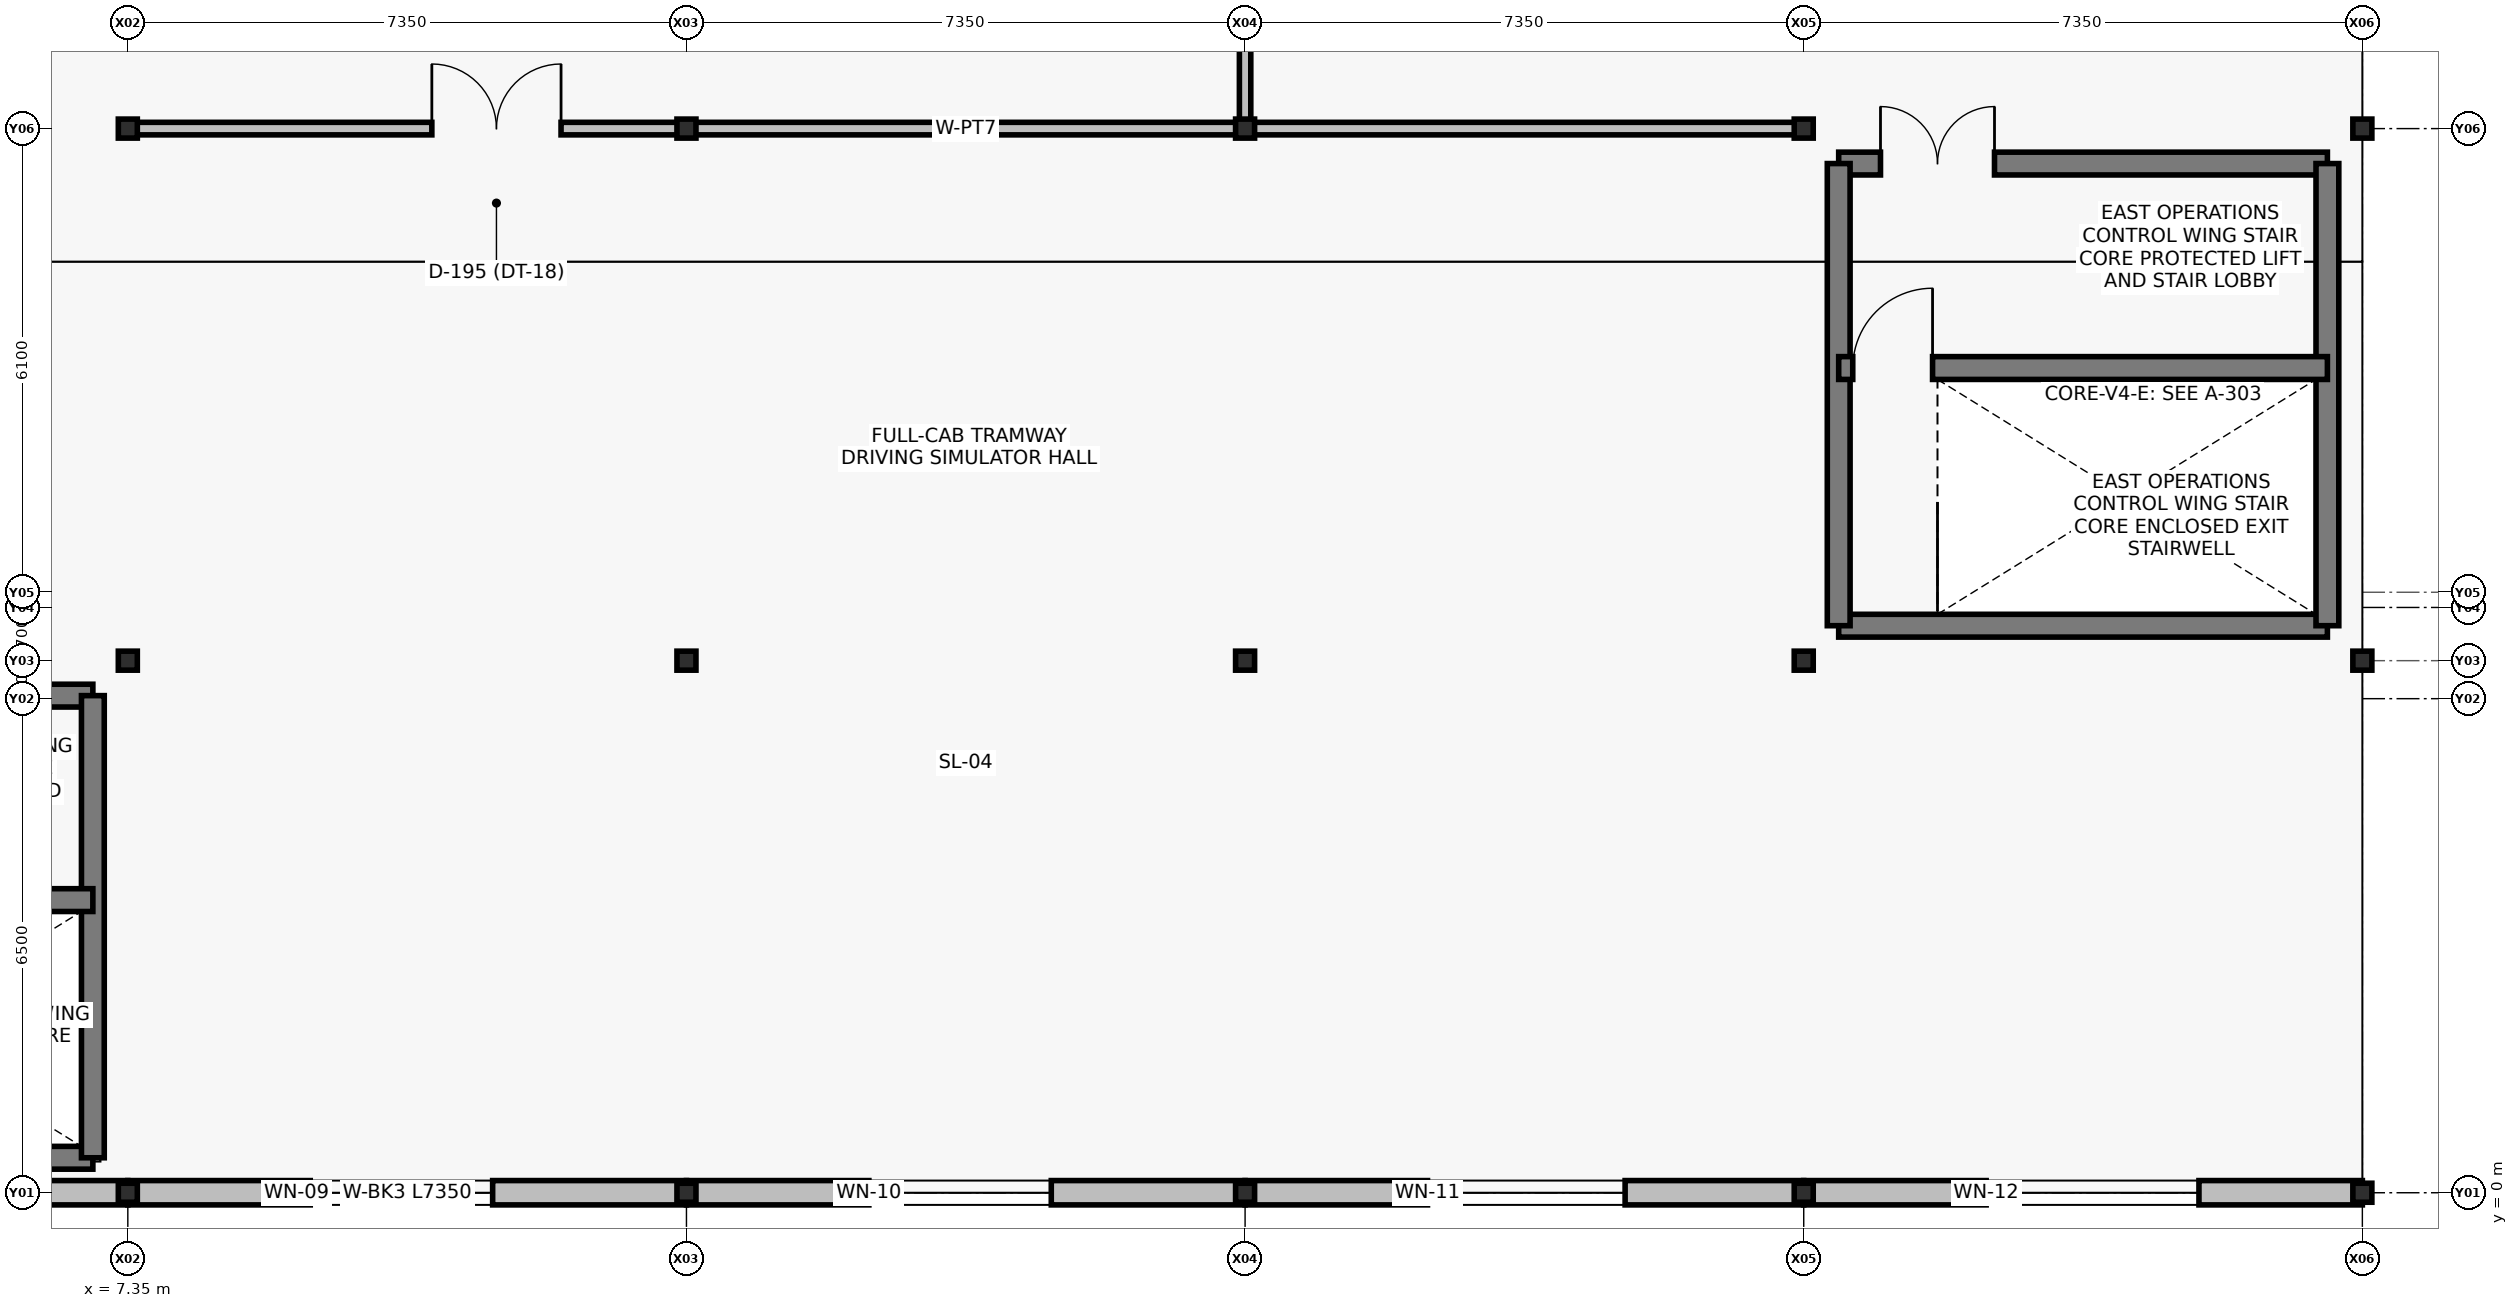
"""IFC4 building model, lengths in metres.
Left out: names, types, materials, properties, quantities, classifications, styles, units other than length and angle.
Written with IfcOpenShell. Run it as: python <this file> out.ifc"""

import sys

from ifc_helpers import new_model, si_unit, direction, frame, frame_2d, origin, origin_with_axes, origin_2d, place, context, subcontext, project, spatial, rectangle, i_section, extrude, element, fill, save


model = new_model("IFC4")
c1 = context("Model", 3, precision=1e-05, world=origin(), true_north=direction((0.0, 1.0)))
c2 = subcontext(c1, "Body", "Model", "MODEL_VIEW")
j1 = project(units=[si_unit("LENGTHUNIT", "METRE"), si_unit("PLANEANGLEUNIT", "RADIAN")], contexts=[c1])
p1 = place(None, origin())
s1 = spatial("IfcSite", under=j1, at=p1, CompositionType="ELEMENT")
p2 = place(p1, origin())
s2 = spatial("IfcBuilding", under=s1, at=p2, CompositionType="ELEMENT")
p3 = place(p2, frame((0.0, 0.0, 15.3)))
s3 = spatial("IfcBuildingStorey", under=s2, at=p3, CompositionType="ELEMENT", Elevation=15.3)
for number, where, z_axis, x_axis in (
    (1, (7.35, 0.0, 0.0), (0.0, 0.0, 1.0), (1.0, 0.0, 0.0)),
    (2, (7.35, 7.0, 0.0), (0.0, 0.0, 1.0), (1.0, 0.0, 0.0)),
    (3, (7.35, 14.0, 0.0), (0.0, 0.0, 1.0), (1.0, 0.0, 0.0)),
    (4, (14.7, 0.0, 0.0), (0.0, 0.0, 1.0), (1.0, 0.0, 0.0)),
    (5, (14.7, 7.0, 0.0), (0.0, 0.0, 1.0), (1.0, 0.0, 0.0)),
    (6, (14.7, 14.0, 0.0), (0.0, 0.0, 1.0), (1.0, 0.0, 0.0)),
    (7, (22.05, 0.0, 0.0), (0.0, 0.0, 1.0), (1.0, 0.0, 0.0)),
    (8, (22.05, 7.0, 0.0), (0.0, 0.0, 1.0), (1.0, 0.0, 0.0)),
    (9, (22.05, 14.0, 0.0), (0.0, 0.0, 1.0), (1.0, 0.0, 0.0)),
    (10, (29.4, 0.0, 0.0), (0.0, 0.0, 1.0), (1.0, 0.0, 0.0)),
    (11, (29.4, 7.0, 0.0), (0.0, 0.0, 1.0), (1.0, 0.0, 0.0)),
    (12, (29.4, 14.0, 0.0), (0.0, 0.0, 1.0), (1.0, 0.0, 0.0)),
    (13, (36.75, 0.0, 0.0), (0.0, 0.0, 1.0), (1.0, 0.0, 0.0)),
    (14, (36.75, 7.0, 0.0), (0.0, 0.0, 1.0), (1.0, 0.0, 0.0)),
    (15, (36.75, 14.0, 0.0), (0.0, 0.0, 1.0), (1.0, 0.0, 0.0)),
):
    element("IfcColumn", number, at=place(p3, frame(where, z_axis=z_axis, x_axis=x_axis)), inside=s3, PredefinedType="COLUMN", context=c2, shape_type="SweptSolid", body=[
        extrude(i_section(OverallWidth=0.25, OverallDepth=0.25, WebThickness=0.009, FlangeThickness=0.014, at=origin_2d()), origin(), (0.0, 0.0, 1.0), 4.2),
    ])
p4 = place(p3, origin_with_axes())
e16 = element("IfcWall", 16, at=p4, inside=s3, PredefinedType="SOLIDWALL", context=c2, shape_type="SweptSolid", body=[
    extrude(rectangle(XDim=7.35, YDim=0.32, at=frame_2d((3.675, 0.0))), origin(), (0.0, 0.0, 1.0), 3.45),
])
p5 = place(p4, frame((2.4, 0.0, 0.9)))
e17 = element("IfcOpeningElement", 17, at=p5, cuts=e16, PredefinedType="OPENING", context=c2, shape_type="SweptSolid", body=[
    extrude(rectangle(XDim=2.1, YDim=2.1, at=frame_2d((1.05, 1.05))), frame((0.0, 0.17, 0.0), z_axis=(0.0, -1.0, 0.0), x_axis=(1.0, 0.0, 0.0)), (0.0, 0.0, 1.0), 0.34),
])
p6 = place(p3, frame((7.35, 0.0, 0.0), z_axis=(0.0, 0.0, 1.0), x_axis=(1.0, 0.0, 0.0)))
e18 = element("IfcWall", 18, at=p6, inside=s3, PredefinedType="SOLIDWALL", context=c2, shape_type="SweptSolid", body=[
    extrude(rectangle(XDim=7.35, YDim=0.32, at=frame_2d((3.675, 0.0))), origin(), (0.0, 0.0, 1.0), 3.45),
])
p7 = place(p6, frame((2.4, 0.0, 0.9)))
e19 = element("IfcOpeningElement", 19, at=p7, cuts=e18, PredefinedType="OPENING", context=c2, shape_type="SweptSolid", body=[
    extrude(rectangle(XDim=2.4, YDim=1.8, at=frame_2d((1.2, 0.9))), frame((0.0, 0.17, 0.0), z_axis=(0.0, -1.0, 0.0), x_axis=(1.0, 0.0, 0.0)), (0.0, 0.0, 1.0), 0.34),
])
p8 = place(p3, frame((14.7, 0.0, 0.0), z_axis=(0.0, 0.0, 1.0), x_axis=(1.0, 0.0, 0.0)))
e20 = element("IfcWall", 20, at=p8, inside=s3, PredefinedType="SOLIDWALL", context=c2, shape_type="SweptSolid", body=[
    extrude(rectangle(XDim=7.35, YDim=0.32, at=frame_2d((3.675, 0.0))), origin(), (0.0, 0.0, 1.0), 3.45),
])
p9 = place(p8, frame((2.4, 0.0, 0.9)))
e21 = element("IfcOpeningElement", 21, at=p9, cuts=e20, PredefinedType="OPENING", context=c2, shape_type="SweptSolid", body=[
    extrude(rectangle(XDim=2.4, YDim=2.1, at=frame_2d((1.2, 1.05))), frame((0.0, 0.17, 0.0), z_axis=(0.0, -1.0, 0.0), x_axis=(1.0, 0.0, 0.0)), (0.0, 0.0, 1.0), 0.34),
])
p10 = place(p3, frame((22.05, 0.0, 0.0), z_axis=(0.0, 0.0, 1.0), x_axis=(1.0, 0.0, 0.0)))
e22 = element("IfcWall", 22, at=p10, inside=s3, PredefinedType="SOLIDWALL", context=c2, shape_type="SweptSolid", body=[
    extrude(rectangle(XDim=7.35, YDim=0.32, at=frame_2d((3.675, 0.0))), origin(), (0.0, 0.0, 1.0), 3.45),
])
p11 = place(p10, frame((2.4, 0.0, 0.9)))
e23 = element("IfcOpeningElement", 23, at=p11, cuts=e22, PredefinedType="OPENING", context=c2, shape_type="SweptSolid", body=[
    extrude(rectangle(XDim=2.6, YDim=2.0, at=frame_2d((1.3, 1.0))), frame((0.0, 0.17, 0.0), z_axis=(0.0, -1.0, 0.0), x_axis=(1.0, 0.0, 0.0)), (0.0, 0.0, 1.0), 0.34),
])
p12 = place(p3, frame((29.4, 0.0, 0.0), z_axis=(0.0, 0.0, 1.0), x_axis=(1.0, 0.0, 0.0)))
e24 = element("IfcWall", 24, at=p12, inside=s3, PredefinedType="SOLIDWALL", context=c2, shape_type="SweptSolid", body=[
    extrude(rectangle(XDim=7.35, YDim=0.32, at=frame_2d((3.675, 0.0))), origin(), (0.0, 0.0, 1.0), 3.45),
])
p13 = place(p12, frame((2.4, 0.0, 0.9)))
e25 = element("IfcOpeningElement", 25, at=p13, cuts=e24, PredefinedType="OPENING", context=c2, shape_type="SweptSolid", body=[
    extrude(rectangle(XDim=2.8, YDim=2.1, at=frame_2d((1.4, 1.05))), frame((0.0, 0.17, 0.0), z_axis=(0.0, -1.0, 0.0), x_axis=(1.0, 0.0, 0.0)), (0.0, 0.0, 1.0), 0.34),
])
p14 = place(p3, frame((29.86, 7.46, 0.0), z_axis=(0.0, 0.0, 1.0), x_axis=(1.0, 0.0, 0.0)))
e26 = element("IfcWall", 26, at=p14, inside=s3, PredefinedType="SHEAR", context=c2, shape_type="SweptSolid", body=[
    extrude(rectangle(XDim=6.43, YDim=0.3, at=frame_2d((3.215, 0.0))), origin(), (0.0, 0.0, 1.0), 3.92),
])
p15 = place(p3, frame((29.86, 13.54, 0.0), z_axis=(0.0, 0.0, 1.0), x_axis=(1.0, 0.0, 0.0)))
e27 = element("IfcWall", 27, at=p15, inside=s3, PredefinedType="SHEAR", context=c2, shape_type="SweptSolid", body=[
    extrude(rectangle(XDim=6.43, YDim=0.3, at=frame_2d((3.215, 0.0))), origin(), (0.0, 0.0, 1.0), 3.92),
])
p16 = place(p15, frame((0.55, 0.0, 0.0)))
e28 = element("IfcOpeningElement", 28, at=p16, cuts=e27, PredefinedType="OPENING", context=c2, shape_type="SweptSolid", body=[
    extrude(rectangle(XDim=1.5, YDim=2.2, at=frame_2d((0.75, 1.1))), frame((0.0, 0.16, 0.0), z_axis=(0.0, -1.0, 0.0), x_axis=(1.0, 0.0, 0.0)), (0.0, 0.0, 1.0), 0.32),
])
for number, where, z_axis, x_axis in (
    (29, (29.86, 7.46, 0.0), (0.0, 0.0, 1.0), (0.0, 1.0, 0.0)),
    (30, (36.29, 7.46, 0.0), (0.0, 0.0, 1.0), (0.0, 1.0, 0.0)),
):
    element("IfcWall", number, at=place(p3, frame(where, z_axis=z_axis, x_axis=x_axis)), inside=s3, PredefinedType="SHEAR", context=c2, shape_type="SweptSolid", body=[
        extrude(rectangle(XDim=6.08, YDim=0.3, at=frame_2d((3.04, 0.0))), origin(), (0.0, 0.0, 1.0), 3.92),
    ])
p17 = place(p3, frame((29.86, 10.85, 0.0), z_axis=(0.0, 0.0, 1.0), x_axis=(1.0, 0.0, 0.0)))
e31 = element("IfcWall", 31, at=p17, inside=s3, PredefinedType="SHEAR", context=c2, shape_type="SweptSolid", body=[
    extrude(rectangle(XDim=6.43, YDim=0.3, at=frame_2d((3.215, 0.0))), origin(), (0.0, 0.0, 1.0), 3.92),
])
p18 = place(p17, frame((0.185, 0.0, 0.0)))
e32 = element("IfcOpeningElement", 32, at=p18, cuts=e31, PredefinedType="OPENING", context=c2, shape_type="SweptSolid", body=[
    extrude(rectangle(XDim=1.05, YDim=2.15, at=frame_2d((0.525, 1.075))), frame((0.0, 0.16, 0.0), z_axis=(0.0, -1.0, 0.0), x_axis=(1.0, 0.0, 0.0)), (0.0, 0.0, 1.0), 0.32),
])
p19 = place(p3, frame((0.46, 0.46, 0.0), z_axis=(0.0, 0.0, 1.0), x_axis=(1.0, 0.0, 0.0)))
e33 = element("IfcWall", 33, at=p19, inside=s3, PredefinedType="SHEAR", context=c2, shape_type="SweptSolid", body=[
    extrude(rectangle(XDim=6.43, YDim=0.3, at=frame_2d((3.215, 0.0))), origin(), (0.0, 0.0, 1.0), 3.92),
])
p20 = place(p3, frame((0.46, 6.54, 0.0), z_axis=(0.0, 0.0, 1.0), x_axis=(1.0, 0.0, 0.0)))
e34 = element("IfcWall", 34, at=p20, inside=s3, PredefinedType="SHEAR", context=c2, shape_type="SweptSolid", body=[
    extrude(rectangle(XDim=6.43, YDim=0.3, at=frame_2d((3.215, 0.0))), origin(), (0.0, 0.0, 1.0), 3.92),
])
p21 = place(p20, frame((0.55, 0.0, 0.0)))
e35 = element("IfcOpeningElement", 35, at=p21, cuts=e34, PredefinedType="OPENING", context=c2, shape_type="SweptSolid", body=[
    extrude(rectangle(XDim=1.5, YDim=2.2, at=frame_2d((0.75, 1.1))), frame((0.0, 0.16, 0.0), z_axis=(0.0, -1.0, 0.0), x_axis=(1.0, 0.0, 0.0)), (0.0, 0.0, 1.0), 0.32),
])
p22 = place(p3, frame((6.89, 0.46, 0.0), z_axis=(0.0, 0.0, 1.0), x_axis=(0.0, 1.0, 0.0)))
e36 = element("IfcWall", 36, at=p22, inside=s3, PredefinedType="SHEAR", context=c2, shape_type="SweptSolid", body=[
    extrude(rectangle(XDim=6.08, YDim=0.3, at=frame_2d((3.04, 0.0))), origin(), (0.0, 0.0, 1.0), 3.92),
])
p23 = place(p3, frame((0.46, 3.85, 0.0), z_axis=(0.0, 0.0, 1.0), x_axis=(1.0, 0.0, 0.0)))
e37 = element("IfcWall", 37, at=p23, inside=s3, PredefinedType="SHEAR", context=c2, shape_type="SweptSolid", body=[
    extrude(rectangle(XDim=6.43, YDim=0.3, at=frame_2d((3.215, 0.0))), origin(), (0.0, 0.0, 1.0), 3.92),
])
p24 = place(p23, frame((0.185, 0.0, 0.0)))
e38 = element("IfcOpeningElement", 38, at=p24, cuts=e37, PredefinedType="OPENING", context=c2, shape_type="SweptSolid", body=[
    extrude(rectangle(XDim=1.05, YDim=2.15, at=frame_2d((0.525, 1.075))), frame((0.0, 0.16, 0.0), z_axis=(0.0, -1.0, 0.0), x_axis=(1.0, 0.0, 0.0)), (0.0, 0.0, 1.0), 0.32),
])
p25 = place(p3, frame((7.35, 14.0, 0.0), z_axis=(0.0, 0.0, 1.0), x_axis=(1.0, 0.0, 0.0)))
e39 = element("IfcWall", 39, at=p25, inside=s3, PredefinedType="PARTITIONING", context=c2, shape_type="SweptSolid", body=[
    extrude(rectangle(XDim=22.05, YDim=0.165, at=frame_2d((11.025, 0.0))), origin(), (0.0, 0.0, 1.0), 3.2),
])
p26 = place(p25, frame((4.0, 0.0, 0.0)))
e40 = element("IfcOpeningElement", 40, at=p26, cuts=e39, PredefinedType="OPENING", context=c2, shape_type="SweptSolid", body=[
    extrude(rectangle(XDim=1.7, YDim=2.25, at=frame_2d((0.85, 1.125))), frame((0.0, 0.092, 0.0), z_axis=(0.0, -1.0, 0.0), x_axis=(1.0, 0.0, 0.0)), (0.0, 0.0, 1.0), 0.185),
])
p27 = place(p3, frame((22.05, 14.0, 0.0), z_axis=(0.0, 0.0, 1.0), x_axis=(0.0, 1.0, 0.0)))
e41 = element("IfcWall", 41, at=p27, inside=s3, PredefinedType="PARTITIONING", context=c2, shape_type="SweptSolid", body=[
    extrude(rectangle(XDim=21.0, YDim=0.15, at=frame_2d((10.5, 0.0))), origin(), (0.0, 0.0, 1.0), 3.2),
])
p28 = place(p27, frame((4.0, 0.0, 0.0)))
e42 = element("IfcOpeningElement", 42, at=p28, cuts=e41, PredefinedType="OPENING", context=c2, shape_type="SweptSolid", body=[
    extrude(rectangle(XDim=1.25, YDim=2.15, at=frame_2d((0.625, 1.075))), frame((0.0, 0.085, 0.0), z_axis=(0.0, -1.0, 0.0), x_axis=(1.0, 0.0, 0.0)), (0.0, 0.0, 1.0), 0.17),
])
p29 = place(p27, frame((17.5, 0.0, 0.0)))
e43 = element("IfcOpeningElement", 43, at=p29, cuts=e41, PredefinedType="OPENING", context=c2, shape_type="SweptSolid", body=[
    extrude(rectangle(XDim=1.15, YDim=2.15, at=frame_2d((0.575, 1.075))), frame((0.0, 0.085, 0.0), z_axis=(0.0, -1.0, 0.0), x_axis=(1.0, 0.0, 0.0)), (0.0, 0.0, 1.0), 0.17),
])
p30 = place(p7, origin())
e44 = element("IfcWindow", 44, at=p30, inside=s3, PartitioningType="SINGLE_PANEL", PredefinedType="WINDOW", context=c2, shape_type="SweptSolid", body=[
    extrude(rectangle(XDim=2.4, YDim=1.8, at=frame_2d((1.2, 0.9))), frame((0.0, 0.03, 0.0), z_axis=(0.0, -1.0, 0.0), x_axis=(1.0, 0.0, 0.0)), (0.0, 0.0, 1.0), 0.06),
])
fill(e19, e44)
p31 = place(p9, origin())
e45 = element("IfcWindow", 45, at=p31, inside=s3, PartitioningType="SINGLE_PANEL", PredefinedType="WINDOW", context=c2, shape_type="SweptSolid", body=[
    extrude(rectangle(XDim=2.4, YDim=2.1, at=frame_2d((1.2, 1.05))), frame((0.0, 0.03, 0.0), z_axis=(0.0, -1.0, 0.0), x_axis=(1.0, 0.0, 0.0)), (0.0, 0.0, 1.0), 0.06),
])
fill(e21, e45)
p32 = place(p11, origin())
e46 = element("IfcWindow", 46, at=p32, inside=s3, PartitioningType="SINGLE_PANEL", PredefinedType="WINDOW", context=c2, shape_type="SweptSolid", body=[
    extrude(rectangle(XDim=2.6, YDim=2.0, at=frame_2d((1.3, 1.0))), frame((0.0, 0.03, 0.0), z_axis=(0.0, -1.0, 0.0), x_axis=(1.0, 0.0, 0.0)), (0.0, 0.0, 1.0), 0.06),
])
fill(e23, e46)
p33 = place(p13, origin())
e47 = element("IfcWindow", 47, at=p33, inside=s3, PartitioningType="SINGLE_PANEL", PredefinedType="WINDOW", context=c2, shape_type="SweptSolid", body=[
    extrude(rectangle(XDim=2.8, YDim=2.1, at=frame_2d((1.4, 1.05))), frame((0.0, 0.03, 0.0), z_axis=(0.0, -1.0, 0.0), x_axis=(1.0, 0.0, 0.0)), (0.0, 0.0, 1.0), 0.06),
])
fill(e25, e47)
p34 = place(p18, origin())
e48 = element("IfcDoor", 48, at=p34, inside=s3, OperationType="SINGLE_SWING_RIGHT", PredefinedType="DOOR", context=c2, shape_type="SweptSolid", body=[
    extrude(rectangle(XDim=1.05, YDim=2.15, at=frame_2d((0.525, 1.075))), frame((0.0, 0.025, 0.0), z_axis=(0.0, -1.0, 0.0), x_axis=(1.0, 0.0, 0.0)), (0.0, 0.0, 1.0), 0.05),
])
fill(e32, e48)
p35 = place(p16, origin())
e49 = element("IfcDoor", 49, at=p35, inside=s3, OperationType="DOUBLE_DOOR_SINGLE_SWING", PredefinedType="DOOR", context=c2, shape_type="SweptSolid", body=[
    extrude(rectangle(XDim=1.5, YDim=2.2, at=frame_2d((0.75, 1.1))), frame((0.0, 0.025, 0.0), z_axis=(0.0, -1.0, 0.0), x_axis=(1.0, 0.0, 0.0)), (0.0, 0.0, 1.0), 0.05),
])
fill(e28, e49)
p36 = place(p26, origin())
e50 = element("IfcDoor", 50, at=p36, inside=s3, OperationType="DOUBLE_DOOR_SINGLE_SWING", PredefinedType="DOOR", context=c2, shape_type="SweptSolid", body=[
    extrude(rectangle(XDim=1.7, YDim=2.25, at=frame_2d((0.85, 1.125))), frame((0.0, 0.025, 0.0), z_axis=(0.0, -1.0, 0.0), x_axis=(1.0, 0.0, 0.0)), (0.0, 0.0, 1.0), 0.05),
])
fill(e40, e50)
save(model, sys.argv[1])
